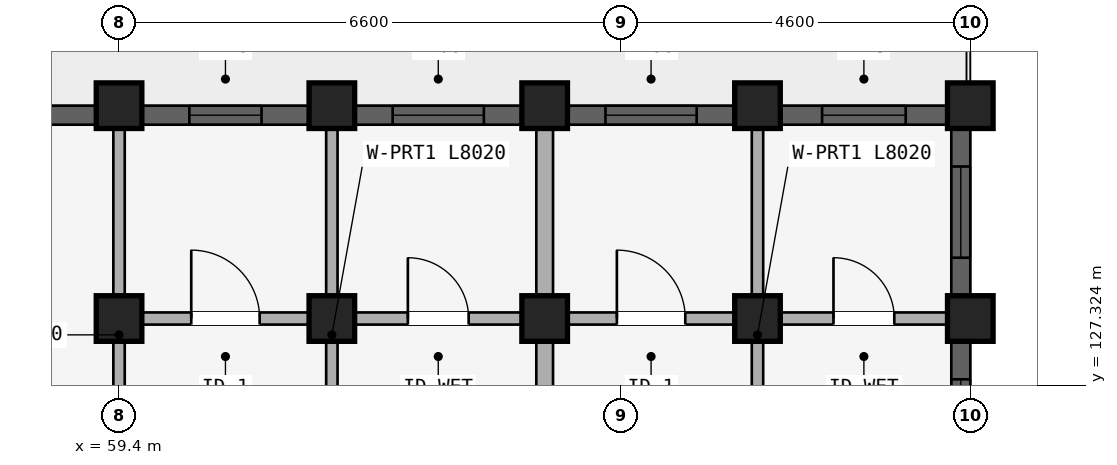
"""IFC4 building model, lengths in metres.
Left out: names, types, materials, properties, quantities, classifications, styles, units other than length and angle.
Written with IfcOpenShell. Run it as: python <this file> out.ifc"""

import sys

from ifc_helpers import new_model, si_unit, direction, frame, frame_2d, origin, origin_2d, place, context, subcontext, project, spatial, rectangle, extrude, element, fill, save


model = new_model("IFC4")
c1 = context("Model", 3, precision=1e-05, world=origin(), true_north=direction((0.0, 1.0)))
c2 = subcontext(c1, "Body", "Model", "MODEL_VIEW")
j1 = project(units=[si_unit("LENGTHUNIT", "METRE"), si_unit("PLANEANGLEUNIT", "RADIAN")], contexts=[c1])
p1 = place(None, origin())
s1 = spatial("IfcSite", under=j1, at=p1, CompositionType="ELEMENT")
p2 = place(p1, origin())
s2 = spatial("IfcBuilding", under=s1, at=p2, CompositionType="ELEMENT")
p3 = place(p2, frame((0.0, 0.0, 40.2)))
s3 = spatial("IfcBuildingStorey", under=s2, at=p3, CompositionType="ELEMENT", Elevation=40.2)
p4 = place(p3, frame((59.4, 128.2, 0.0), z_axis=(0.0, 0.0, 1.0), x_axis=(1.0, 0.0, 0.0)))
e1 = element("IfcColumn", 1, at=p4, inside=s3, PredefinedType="COLUMN", context=c2, shape_type="SweptSolid", body=[
    extrude(rectangle(XDim=0.6, YDim=0.6, at=origin_2d()), origin(), (0.0, 0.0, 1.0), 2.93),
])
p5 = place(p3, frame((59.4, 131.0, 0.0), z_axis=(0.0, 0.0, 1.0), x_axis=(1.0, 0.0, 0.0)))
e2 = element("IfcColumn", 2, at=p5, inside=s3, PredefinedType="COLUMN", context=c2, shape_type="SweptSolid", body=[
    extrude(rectangle(XDim=0.6, YDim=0.6, at=origin_2d()), origin(), (0.0, 0.0, 1.0), 2.97),
])
p6 = place(p3, frame((62.2, 128.2, 0.0), z_axis=(0.0, 0.0, 1.0), x_axis=(1.0, 0.0, 0.0)))
e3 = element("IfcColumn", 3, at=p6, inside=s3, PredefinedType="COLUMN", context=c2, shape_type="SweptSolid", body=[
    extrude(rectangle(XDim=0.6, YDim=0.6, at=origin_2d()), origin(), (0.0, 0.0, 1.0), 2.93),
])
p7 = place(p3, frame((62.2, 131.0, 0.0), z_axis=(0.0, 0.0, 1.0), x_axis=(1.0, 0.0, 0.0)))
e4 = element("IfcColumn", 4, at=p7, inside=s3, PredefinedType="COLUMN", context=c2, shape_type="SweptSolid", body=[
    extrude(rectangle(XDim=0.6, YDim=0.6, at=origin_2d()), origin(), (0.0, 0.0, 1.0), 2.97),
])
p8 = place(p3, frame((65.0, 128.2, 0.0), z_axis=(0.0, 0.0, 1.0), x_axis=(1.0, 0.0, 0.0)))
e5 = element("IfcColumn", 5, at=p8, inside=s3, PredefinedType="COLUMN", context=c2, shape_type="SweptSolid", body=[
    extrude(rectangle(XDim=0.6, YDim=0.6, at=origin_2d()), origin(), (0.0, 0.0, 1.0), 2.93),
])
p9 = place(p3, frame((65.0, 131.0, 0.0), z_axis=(0.0, 0.0, 1.0), x_axis=(1.0, 0.0, 0.0)))
e6 = element("IfcColumn", 6, at=p9, inside=s3, PredefinedType="COLUMN", context=c2, shape_type="SweptSolid", body=[
    extrude(rectangle(XDim=0.6, YDim=0.6, at=origin_2d()), origin(), (0.0, 0.0, 1.0), 2.97),
])
p10 = place(p3, frame((67.8, 128.2, 0.0), z_axis=(0.0, 0.0, 1.0), x_axis=(1.0, 0.0, 0.0)))
e7 = element("IfcColumn", 7, at=p10, inside=s3, PredefinedType="COLUMN", context=c2, shape_type="SweptSolid", body=[
    extrude(rectangle(XDim=0.6, YDim=0.6, at=origin_2d()), origin(), (0.0, 0.0, 1.0), 2.93),
])
p11 = place(p3, frame((67.8, 131.0, 0.0), z_axis=(0.0, 0.0, 1.0), x_axis=(1.0, 0.0, 0.0)))
e8 = element("IfcColumn", 8, at=p11, inside=s3, PredefinedType="COLUMN", context=c2, shape_type="SweptSolid", body=[
    extrude(rectangle(XDim=0.6, YDim=0.6, at=origin_2d()), origin(), (0.0, 0.0, 1.0), 2.97),
])
p12 = place(p3, frame((70.6, 128.2, 0.0), z_axis=(0.0, 0.0, 1.0), x_axis=(1.0, 0.0, 0.0)))
e9 = element("IfcColumn", 9, at=p12, inside=s3, PredefinedType="COLUMN", context=c2, shape_type="SweptSolid", body=[
    extrude(rectangle(XDim=0.6, YDim=0.6, at=origin_2d()), origin(), (0.0, 0.0, 1.0), 2.93),
])
p13 = place(p3, frame((70.6, 131.0, 0.0), z_axis=(0.0, 0.0, 1.0), x_axis=(1.0, 0.0, 0.0)))
e10 = element("IfcColumn", 10, at=p13, inside=s3, PredefinedType="COLUMN", context=c2, shape_type="SweptSolid", body=[
    extrude(rectangle(XDim=0.6, YDim=0.6, at=origin_2d()), origin(), (0.0, 0.0, 1.0), 2.97),
])
p14 = place(p3, frame((59.48, 128.2, 0.0), z_axis=(0.0, 0.0, 1.0), x_axis=(1.0, 0.0, 0.0)))
e11 = element("IfcWall", 11, at=p14, inside=s3, PredefinedType="PLUMBINGWALL", context=c2, shape_type="SweptSolid", body=[
    extrude(rectangle(XDim=2.64, YDim=0.16, at=frame_2d((1.32, 0.0))), origin(), (0.0, 0.0, 1.0), 2.372),
])
p15 = place(p14, frame((0.87, 0.0, 0.0)))
e12 = element("IfcOpeningElement", 12, at=p15, cuts=e11, PredefinedType="OPENING", context=c2, shape_type="SweptSolid", body=[
    extrude(rectangle(XDim=0.9, YDim=2.1, at=frame_2d((0.45, 1.05))), frame((0.0, 0.09, 0.0), z_axis=(0.0, -1.0, 0.0), x_axis=(1.0, 0.0, 0.0)), (0.0, 0.0, 1.0), 0.18),
])
p16 = place(p3, frame((62.28, 128.2, 0.0), z_axis=(0.0, 0.0, 1.0), x_axis=(1.0, 0.0, 0.0)))
e13 = element("IfcWall", 13, at=p16, inside=s3, PredefinedType="PLUMBINGWALL", context=c2, shape_type="SweptSolid", body=[
    extrude(rectangle(XDim=2.64, YDim=0.16, at=frame_2d((1.32, 0.0))), origin(), (0.0, 0.0, 1.0), 2.372),
])
p17 = place(p16, frame((0.92, 0.0, 0.0)))
e14 = element("IfcOpeningElement", 14, at=p17, cuts=e13, PredefinedType="OPENING", context=c2, shape_type="SweptSolid", body=[
    extrude(rectangle(XDim=0.8, YDim=2.1, at=frame_2d((0.4, 1.05))), frame((0.0, 0.09, 0.0), z_axis=(0.0, -1.0, 0.0), x_axis=(1.0, 0.0, 0.0)), (0.0, 0.0, 1.0), 0.18),
])
p18 = place(p3, frame((65.08, 128.2, 0.0), z_axis=(0.0, 0.0, 1.0), x_axis=(1.0, 0.0, 0.0)))
e15 = element("IfcWall", 15, at=p18, inside=s3, PredefinedType="PLUMBINGWALL", context=c2, shape_type="SweptSolid", body=[
    extrude(rectangle(XDim=2.64, YDim=0.16, at=frame_2d((1.32, 0.0))), origin(), (0.0, 0.0, 1.0), 2.372),
])
p19 = place(p18, frame((0.87, 0.0, 0.0)))
e16 = element("IfcOpeningElement", 16, at=p19, cuts=e15, PredefinedType="OPENING", context=c2, shape_type="SweptSolid", body=[
    extrude(rectangle(XDim=0.9, YDim=2.1, at=frame_2d((0.45, 1.05))), frame((0.0, 0.09, 0.0), z_axis=(0.0, -1.0, 0.0), x_axis=(1.0, 0.0, 0.0)), (0.0, 0.0, 1.0), 0.18),
])
p20 = place(p3, frame((67.88, 128.2, 0.0), z_axis=(0.0, 0.0, 1.0), x_axis=(1.0, 0.0, 0.0)))
e17 = element("IfcWall", 17, at=p20, inside=s3, PredefinedType="PLUMBINGWALL", context=c2, shape_type="SweptSolid", body=[
    extrude(rectangle(XDim=2.64, YDim=0.16, at=frame_2d((1.32, 0.0))), origin(), (0.0, 0.0, 1.0), 2.372),
])
p21 = place(p20, frame((0.92, 0.0, 0.0)))
e18 = element("IfcOpeningElement", 18, at=p21, cuts=e17, PredefinedType="OPENING", context=c2, shape_type="SweptSolid", body=[
    extrude(rectangle(XDim=0.8, YDim=2.1, at=frame_2d((0.4, 1.05))), frame((0.0, 0.09, 0.0), z_axis=(0.0, -1.0, 0.0), x_axis=(1.0, 0.0, 0.0)), (0.0, 0.0, 1.0), 0.18),
])
p22 = place(p3, frame((59.4, 122.7, 0.0), z_axis=(0.0, 0.0, 1.0), x_axis=(0.0, 1.0, 0.0)))
e19 = element("IfcWall", 19, at=p22, inside=s3, PredefinedType="PARTITIONING", context=c2, shape_type="SweptSolid", body=[
    extrude(rectangle(XDim=8.02, YDim=0.15, at=frame_2d((4.01, 0.0))), origin(), (0.0, 0.0, 1.0), 2.372),
])
p23 = place(p22, frame((0.9, 0.0, 0.0)))
e20 = element("IfcOpeningElement", 20, at=p23, cuts=e19, PredefinedType="OPENING", context=c2, shape_type="SweptSolid", body=[
    extrude(rectangle(XDim=0.8, YDim=2.1, at=frame_2d((0.4, 1.05))), frame((0.0, 0.085, 0.0), z_axis=(0.0, -1.0, 0.0), x_axis=(1.0, 0.0, 0.0)), (0.0, 0.0, 1.0), 0.17),
])
p24 = place(p3, frame((62.2, 122.7, 0.0), z_axis=(0.0, 0.0, 1.0), x_axis=(0.0, 1.0, 0.0)))
e21 = element("IfcWall", 21, at=p24, inside=s3, PredefinedType="PARTITIONING", context=c2, shape_type="SweptSolid", body=[
    extrude(rectangle(XDim=8.02, YDim=0.15, at=frame_2d((4.01, 0.0))), origin(), (0.0, 0.0, 1.0), 2.372),
])
p25 = place(p24, frame((0.9, 0.0, 0.0)))
e22 = element("IfcOpeningElement", 22, at=p25, cuts=e21, PredefinedType="OPENING", context=c2, shape_type="SweptSolid", body=[
    extrude(rectangle(XDim=0.8, YDim=2.1, at=frame_2d((0.4, 1.05))), frame((0.0, 0.085, 0.0), z_axis=(0.0, -1.0, 0.0), x_axis=(1.0, 0.0, 0.0)), (0.0, 0.0, 1.0), 0.17),
])
p26 = place(p3, frame((65.0, 122.7, 0.0), z_axis=(0.0, 0.0, 1.0), x_axis=(0.0, 1.0, 0.0)))
e23 = element("IfcWall", 23, at=p26, inside=s3, PredefinedType="STANDARD", context=c2, shape_type="SweptSolid", body=[
    extrude(rectangle(XDim=8.02, YDim=0.22, at=frame_2d((4.01, 0.0))), origin(), (0.0, 0.0, 1.0), 2.372),
])
p27 = place(p3, frame((67.8, 122.7, 0.0), z_axis=(0.0, 0.0, 1.0), x_axis=(0.0, 1.0, 0.0)))
e24 = element("IfcWall", 24, at=p27, inside=s3, PredefinedType="PARTITIONING", context=c2, shape_type="SweptSolid", body=[
    extrude(rectangle(XDim=8.02, YDim=0.15, at=frame_2d((4.01, 0.0))), origin(), (0.0, 0.0, 1.0), 2.372),
])
p28 = place(p27, frame((0.9, 0.0, 0.0)))
e25 = element("IfcOpeningElement", 25, at=p28, cuts=e24, PredefinedType="OPENING", context=c2, shape_type="SweptSolid", body=[
    extrude(rectangle(XDim=0.8, YDim=2.1, at=frame_2d((0.4, 1.05))), frame((0.0, 0.085, 0.0), z_axis=(0.0, -1.0, 0.0), x_axis=(1.0, 0.0, 0.0)), (0.0, 0.0, 1.0), 0.17),
])
p29 = place(p3, frame((54.104, 130.875, 0.0), z_axis=(0.0, 0.0, 1.0), x_axis=(1.0, 0.0, 0.0)))
e26 = element("IfcWall", 26, at=p29, inside=s3, PredefinedType="STANDARD", context=c2, shape_type="SweptSolid", body=[
    extrude(rectangle(XDim=4.993, YDim=0.25, at=frame_2d((2.497, 0.0))), origin(), (0.0, 0.0, 1.0), 2.48),
])
p30 = place(p29, frame((1.947, 0.0, 0.83)))
e27 = element("IfcOpeningElement", 27, at=p30, cuts=e26, PredefinedType="OPENING", context=c2, shape_type="SweptSolid", body=[
    extrude(rectangle(XDim=1.1, YDim=1.45, at=frame_2d((0.55, 0.725))), frame((0.0, 0.135, 0.0), z_axis=(0.0, -1.0, 0.0), x_axis=(1.0, 0.0, 0.0)), (0.0, 0.0, 1.0), 0.27),
])
p31 = place(p3, frame((59.704, 130.875, 0.0), z_axis=(0.0, 0.0, 1.0), x_axis=(1.0, 0.0, 0.0)))
e28 = element("IfcWall", 28, at=p31, inside=s3, PredefinedType="STANDARD", context=c2, shape_type="SweptSolid", body=[
    extrude(rectangle(XDim=2.193, YDim=0.25, at=frame_2d((1.096, 0.0))), origin(), (0.0, 0.0, 1.0), 2.48),
])
p32 = place(p31, frame((0.622, 0.0, 0.88)))
e29 = element("IfcOpeningElement", 29, at=p32, cuts=e28, PredefinedType="OPENING", context=c2, shape_type="SweptSolid", body=[
    extrude(rectangle(XDim=0.95, YDim=1.35, at=frame_2d((0.475, 0.675))), frame((0.0, 0.135, 0.0), z_axis=(0.0, -1.0, 0.0), x_axis=(1.0, 0.0, 0.0)), (0.0, 0.0, 1.0), 0.27),
])
p33 = place(p3, frame((62.503, 130.875, 0.0), z_axis=(0.0, 0.0, 1.0), x_axis=(1.0, 0.0, 0.0)))
e30 = element("IfcWall", 30, at=p33, inside=s3, PredefinedType="STANDARD", context=c2, shape_type="SweptSolid", body=[
    extrude(rectangle(XDim=2.193, YDim=0.25, at=frame_2d((1.097, 0.0))), origin(), (0.0, 0.0, 1.0), 2.48),
])
p34 = place(p33, frame((0.497, 0.0, 0.78)))
e31 = element("IfcOpeningElement", 31, at=p34, cuts=e30, PredefinedType="OPENING", context=c2, shape_type="SweptSolid", body=[
    extrude(rectangle(XDim=1.2, YDim=1.5, at=frame_2d((0.6, 0.75))), frame((0.0, 0.135, 0.0), z_axis=(0.0, -1.0, 0.0), x_axis=(1.0, 0.0, 0.0)), (0.0, 0.0, 1.0), 0.27),
])
p35 = place(p3, frame((65.303, 130.875, 0.0), z_axis=(0.0, 0.0, 1.0), x_axis=(1.0, 0.0, 0.0)))
e32 = element("IfcWall", 32, at=p35, inside=s3, PredefinedType="STANDARD", context=c2, shape_type="SweptSolid", body=[
    extrude(rectangle(XDim=2.193, YDim=0.25, at=frame_2d((1.097, 0.0))), origin(), (0.0, 0.0, 1.0), 2.48),
])
p36 = place(p35, frame((0.497, 0.0, 0.78)))
e33 = element("IfcOpeningElement", 33, at=p36, cuts=e32, PredefinedType="OPENING", context=c2, shape_type="SweptSolid", body=[
    extrude(rectangle(XDim=1.2, YDim=1.5, at=frame_2d((0.6, 0.75))), frame((0.0, 0.135, 0.0), z_axis=(0.0, -1.0, 0.0), x_axis=(1.0, 0.0, 0.0)), (0.0, 0.0, 1.0), 0.27),
])
p37 = place(p3, frame((68.104, 130.875, 0.0), z_axis=(0.0, 0.0, 1.0), x_axis=(1.0, 0.0, 0.0)))
e34 = element("IfcWall", 34, at=p37, inside=s3, PredefinedType="STANDARD", context=c2, shape_type="SweptSolid", body=[
    extrude(rectangle(XDim=2.193, YDim=0.25, at=frame_2d((1.096, 0.0))), origin(), (0.0, 0.0, 1.0), 2.48),
])
p38 = place(p37, frame((0.546, 0.0, 0.83)))
e35 = element("IfcOpeningElement", 35, at=p38, cuts=e34, PredefinedType="OPENING", context=c2, shape_type="SweptSolid", body=[
    extrude(rectangle(XDim=1.1, YDim=1.45, at=frame_2d((0.55, 0.725))), frame((0.0, 0.135, 0.0), z_axis=(0.0, -1.0, 0.0), x_axis=(1.0, 0.0, 0.0)), (0.0, 0.0, 1.0), 0.27),
])
p39 = place(p3, frame((70.475, 125.704, 0.0), z_axis=(0.0, 0.0, 1.0), x_axis=(0.0, 1.0, 0.0)))
e36 = element("IfcWall", 36, at=p39, inside=s3, PredefinedType="STANDARD", context=c2, shape_type="SweptSolid", body=[
    extrude(rectangle(XDim=2.193, YDim=0.25, at=frame_2d((1.096, 0.0))), origin(), (0.0, 0.0, 1.0), 2.372),
])
p40 = place(p39, frame((0.497, 0.0, 0.672)))
e37 = element("IfcOpeningElement", 37, at=p40, cuts=e36, PredefinedType="OPENING", context=c2, shape_type="SweptSolid", body=[
    extrude(rectangle(XDim=1.2, YDim=1.5, at=frame_2d((0.6, 0.75))), frame((0.0, 0.135, 0.0), z_axis=(0.0, -1.0, 0.0), x_axis=(1.0, 0.0, 0.0)), (0.0, 0.0, 1.0), 0.27),
])
p41 = place(p3, frame((70.475, 128.503, 0.0), z_axis=(0.0, 0.0, 1.0), x_axis=(0.0, 1.0, 0.0)))
e38 = element("IfcWall", 38, at=p41, inside=s3, PredefinedType="STANDARD", context=c2, shape_type="SweptSolid", body=[
    extrude(rectangle(XDim=2.193, YDim=0.25, at=frame_2d((1.097, 0.0))), origin(), (0.0, 0.0, 1.0), 2.412),
])
p42 = place(p41, frame((0.497, 0.0, 0.712)))
e39 = element("IfcOpeningElement", 39, at=p42, cuts=e38, PredefinedType="OPENING", context=c2, shape_type="SweptSolid", body=[
    extrude(rectangle(XDim=1.2, YDim=1.5, at=frame_2d((0.6, 0.75))), frame((0.0, 0.135, 0.0), z_axis=(0.0, -1.0, 0.0), x_axis=(1.0, 0.0, 0.0)), (0.0, 0.0, 1.0), 0.27),
])
p43 = place(p32, origin())
e40 = element("IfcWindow", 40, at=p43, inside=s3, PartitioningType="SINGLE_PANEL", PredefinedType="WINDOW", context=c2, shape_type="SweptSolid", body=[
    extrude(rectangle(XDim=0.95, YDim=1.35, at=frame_2d((0.475, 0.675))), frame((0.0, 0.03, 0.0), z_axis=(0.0, -1.0, 0.0), x_axis=(1.0, 0.0, 0.0)), (0.0, 0.0, 1.0), 0.06),
])
fill(e29, e40)
p44 = place(p34, origin())
e41 = element("IfcWindow", 41, at=p44, inside=s3, PartitioningType="SINGLE_PANEL", PredefinedType="WINDOW", context=c2, shape_type="SweptSolid", body=[
    extrude(rectangle(XDim=1.2, YDim=1.5, at=frame_2d((0.6, 0.75))), frame((0.0, 0.03, 0.0), z_axis=(0.0, -1.0, 0.0), x_axis=(1.0, 0.0, 0.0)), (0.0, 0.0, 1.0), 0.06),
])
fill(e31, e41)
p45 = place(p36, origin())
e42 = element("IfcWindow", 42, at=p45, inside=s3, PartitioningType="SINGLE_PANEL", PredefinedType="WINDOW", context=c2, shape_type="SweptSolid", body=[
    extrude(rectangle(XDim=1.2, YDim=1.5, at=frame_2d((0.6, 0.75))), frame((0.0, 0.03, 0.0), z_axis=(0.0, -1.0, 0.0), x_axis=(1.0, 0.0, 0.0)), (0.0, 0.0, 1.0), 0.06),
])
fill(e33, e42)
p46 = place(p38, origin())
e43 = element("IfcWindow", 43, at=p46, inside=s3, PartitioningType="SINGLE_PANEL", PredefinedType="WINDOW", context=c2, shape_type="SweptSolid", body=[
    extrude(rectangle(XDim=1.1, YDim=1.45, at=frame_2d((0.55, 0.725))), frame((0.0, 0.03, 0.0), z_axis=(0.0, -1.0, 0.0), x_axis=(1.0, 0.0, 0.0)), (0.0, 0.0, 1.0), 0.06),
])
fill(e35, e43)
p47 = place(p40, origin())
e44 = element("IfcWindow", 44, at=p47, inside=s3, PartitioningType="SINGLE_PANEL", PredefinedType="WINDOW", context=c2, shape_type="SweptSolid", body=[
    extrude(rectangle(XDim=1.2, YDim=1.5, at=frame_2d((0.6, 0.75))), frame((0.0, 0.03, 0.0), z_axis=(0.0, -1.0, 0.0), x_axis=(1.0, 0.0, 0.0)), (0.0, 0.0, 1.0), 0.06),
])
fill(e37, e44)
p48 = place(p42, origin())
e45 = element("IfcWindow", 45, at=p48, inside=s3, PartitioningType="SINGLE_PANEL", PredefinedType="WINDOW", context=c2, shape_type="SweptSolid", body=[
    extrude(rectangle(XDim=1.2, YDim=1.5, at=frame_2d((0.6, 0.75))), frame((0.0, 0.03, 0.0), z_axis=(0.0, -1.0, 0.0), x_axis=(1.0, 0.0, 0.0)), (0.0, 0.0, 1.0), 0.06),
])
fill(e39, e45)
p49 = place(p15, origin())
e46 = element("IfcDoor", 46, at=p49, inside=s3, OperationType="SINGLE_SWING_LEFT", PredefinedType="DOOR", context=c2, shape_type="SweptSolid", body=[
    extrude(rectangle(XDim=0.9, YDim=2.1, at=frame_2d((0.45, 1.05))), frame((0.0, 0.025, 0.0), z_axis=(0.0, -1.0, 0.0), x_axis=(1.0, 0.0, 0.0)), (0.0, 0.0, 1.0), 0.05),
])
fill(e12, e46)
p50 = place(p17, origin())
e47 = element("IfcDoor", 47, at=p50, inside=s3, OperationType="SINGLE_SWING_LEFT", PredefinedType="DOOR", context=c2, shape_type="SweptSolid", body=[
    extrude(rectangle(XDim=0.8, YDim=2.1, at=frame_2d((0.4, 1.05))), frame((0.0, 0.025, 0.0), z_axis=(0.0, -1.0, 0.0), x_axis=(1.0, 0.0, 0.0)), (0.0, 0.0, 1.0), 0.05),
])
fill(e14, e47)
p51 = place(p19, origin())
e48 = element("IfcDoor", 48, at=p51, inside=s3, OperationType="SINGLE_SWING_LEFT", PredefinedType="DOOR", context=c2, shape_type="SweptSolid", body=[
    extrude(rectangle(XDim=0.9, YDim=2.1, at=frame_2d((0.45, 1.05))), frame((0.0, 0.025, 0.0), z_axis=(0.0, -1.0, 0.0), x_axis=(1.0, 0.0, 0.0)), (0.0, 0.0, 1.0), 0.05),
])
fill(e16, e48)
p52 = place(p21, origin())
e49 = element("IfcDoor", 49, at=p52, inside=s3, OperationType="SINGLE_SWING_LEFT", PredefinedType="DOOR", context=c2, shape_type="SweptSolid", body=[
    extrude(rectangle(XDim=0.8, YDim=2.1, at=frame_2d((0.4, 1.05))), frame((0.0, 0.025, 0.0), z_axis=(0.0, -1.0, 0.0), x_axis=(1.0, 0.0, 0.0)), (0.0, 0.0, 1.0), 0.05),
])
fill(e18, e49)
save(model, sys.argv[1])
